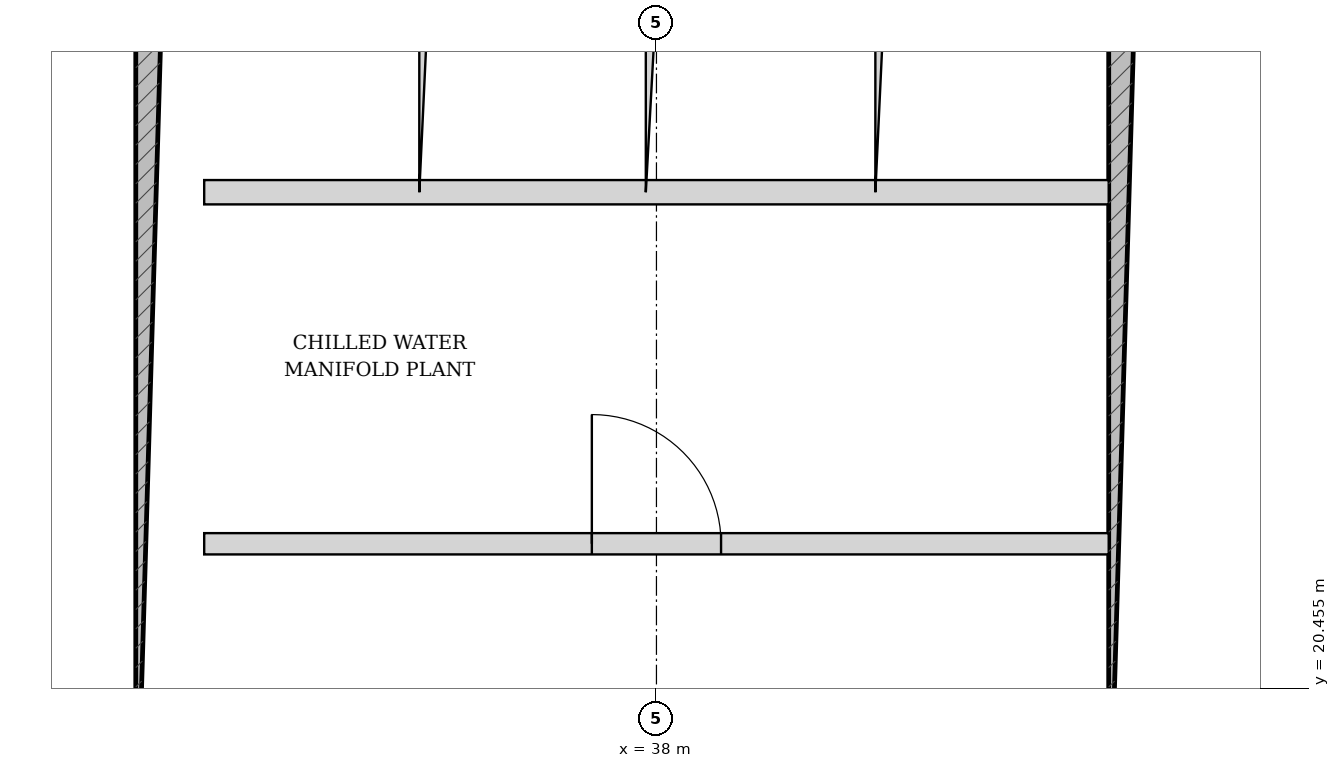
"""IFC4 building model, lengths in metres.
Left out: names, types, materials, properties, quantities, classifications, styles, units other than length and angle.
Written with IfcOpenShell. Run it as: python <this file> out.ifc"""

import sys

from ifc_helpers import new_model, si_unit, direction, frame, frame_2d, origin, place, context, subcontext, project, spatial, rectangle, extrude, source, transform, mapped, element, fill, save


model = new_model("IFC4")
c1 = context("Model", 3, precision=1e-05, world=origin(), true_north=direction((-0.2419218956, 0.970295726276)))
c2 = subcontext(c1, "Body", "Model", "MODEL_VIEW")
j1 = project(units=[si_unit("LENGTHUNIT", "METRE"), si_unit("PLANEANGLEUNIT", "RADIAN")], contexts=[c1])
p1 = place(None, origin())
s1 = spatial("IfcSite", under=j1, at=p1, CompositionType="ELEMENT")
p2 = place(p1, origin())
s2 = spatial("IfcBuilding", under=s1, at=p2, CompositionType="ELEMENT")
p3 = place(p2, frame((0.0, 0.0, 123.0)))
s3 = spatial("IfcBuildingStorey", under=s2, at=p3, CompositionType="ELEMENT", Elevation=123.0)
p4 = place(p3, frame((34.8, 19.175, 0.0), z_axis=(0.0, 0.0, 1.0), x_axis=(0.0, 1.0, 0.0)))
e1 = element("IfcWall", 1, at=p4, inside=s3, PredefinedType="SHEAR", context=c2, shape_type="SweptSolid", body=[
    extrude(rectangle(XDim=15.25, YDim=0.45, at=frame_2d((7.625, 0.0))), origin(), (0.0, 0.0, 1.0), 3.325),
])
p5 = place(p4, frame((7.8, 0.0, 0.0)))
e2 = element("IfcOpeningElement", 2, at=p5, cuts=e1, PredefinedType="OPENING", context=c2, shape_type="SweptSolid", body=[
    extrude(rectangle(XDim=1.05, YDim=2.15, at=frame_2d((0.525, 1.075))), frame((0.0, 0.235, 0.0), z_axis=(0.0, -1.0, 0.0), x_axis=(1.0, 0.0, 0.0)), (0.0, 0.0, 1.0), 0.47),
])
p6 = place(p3, frame((41.2, 19.175, 0.0), z_axis=(0.0, 0.0, 1.0), x_axis=(0.0, 1.0, 0.0)))
e3 = element("IfcWall", 3, at=p6, inside=s3, PredefinedType="SHEAR", context=c2, shape_type="SweptSolid", body=[
    extrude(rectangle(XDim=15.25, YDim=0.45, at=frame_2d((7.625, 0.0))), origin(), (0.0, 0.0, 1.0), 3.325),
])
p7 = place(p6, frame((7.8, 0.0, 0.0)))
e4 = element("IfcOpeningElement", 4, at=p7, cuts=e3, PredefinedType="OPENING", context=c2, shape_type="SweptSolid", body=[
    extrude(rectangle(XDim=1.05, YDim=2.15, at=frame_2d((0.525, 1.075))), frame((0.0, 0.235, 0.0), z_axis=(0.0, -1.0, 0.0), x_axis=(1.0, 0.0, 0.0)), (0.0, 0.0, 1.0), 0.47),
])
p8 = place(p3, frame((35.025, 23.72, 0.0), z_axis=(0.0, 0.0, 1.0), x_axis=(1.0, 0.0, 0.0)))
e5 = element("IfcWall", 5, at=p8, inside=s3, PredefinedType="PARTITIONING", context=c2, shape_type="SweptSolid", body=[
    extrude(rectangle(XDim=5.95, YDim=0.16, at=frame_2d((2.975, 0.0))), origin(), (0.0, 0.0, 1.0), 3.325),
])
p9 = place(p3, frame((36.5, 23.72, 0.0), z_axis=(0.0, 0.0, 1.0), x_axis=(0.0, 1.0, 0.0)))
e6 = element("IfcWall", 6, at=p9, inside=s3, PredefinedType="PARTITIONING", context=c2, shape_type="SweptSolid", body=[
    extrude(rectangle(XDim=2.56, YDim=0.12, at=frame_2d((1.28, 0.0))), origin(), (0.0, 0.0, 1.0), 3.325),
])
p10 = place(p3, frame((38.0, 23.72, 0.0), z_axis=(0.0, 0.0, 1.0), x_axis=(0.0, 1.0, 0.0)))
e7 = element("IfcWall", 7, at=p10, inside=s3, PredefinedType="PARTITIONING", context=c2, shape_type="SweptSolid", body=[
    extrude(rectangle(XDim=2.56, YDim=0.14, at=frame_2d((1.28, 0.0))), origin(), (0.0, 0.0, 1.0), 3.325),
])
p11 = place(p3, frame((39.5, 23.72, 0.0), z_axis=(0.0, 0.0, 1.0), x_axis=(0.0, 1.0, 0.0)))
e8 = element("IfcWall", 8, at=p11, inside=s3, PredefinedType="PARTITIONING", context=c2, shape_type="SweptSolid", body=[
    extrude(rectangle(XDim=2.56, YDim=0.12, at=frame_2d((1.28, 0.0))), origin(), (0.0, 0.0, 1.0), 3.325),
])
p12 = place(p3, frame((35.025, 21.407, 0.0), z_axis=(0.0, 0.0, 1.0), x_axis=(1.0, 0.0, 0.0)))
e9 = element("IfcWall", 9, at=p12, inside=s3, PredefinedType="PARTITIONING", context=c2, shape_type="SweptSolid", body=[
    extrude(rectangle(XDim=5.95, YDim=0.14, at=frame_2d((2.975, 0.0))), origin(), (0.0, 0.0, 1.0), 3.325),
])
p13 = place(p12, frame((2.55, 0.0, 0.0)))
e10 = element("IfcOpeningElement", 10, at=p13, cuts=e9, PredefinedType="OPENING", context=c2, shape_type="SweptSolid", body=[
    extrude(rectangle(XDim=0.85, YDim=2.1, at=frame_2d((0.425, 1.05))), frame((0.0, 0.08, 0.0), z_axis=(0.0, -1.0, 0.0), x_axis=(1.0, 0.0, 0.0)), (0.0, 0.0, 1.0), 0.16),
])
m1 = source(origin(), c2, "Body", "SweptSolid", [
    extrude(rectangle(XDim=0.85, YDim=2.1, at=frame_2d((0.425, 1.05))), frame((0.0, 0.025, 0.0), z_axis=(0.0, -1.0, 0.0), x_axis=(1.0, 0.0, 0.0)), (0.0, 0.0, 1.0), 0.05),
])
p14 = place(p13, origin())
e11 = element("IfcDoor", 11, at=p14, inside=s3, OperationType="SINGLE_SWING_LEFT", PredefinedType="DOOR", context=c2, shape_type="MappedRepresentation", body=[
    mapped(m1, transform((0.0, 0.0, 0.0), scale=1.0)),
])
fill(e10, e11)
save(model, sys.argv[1])
